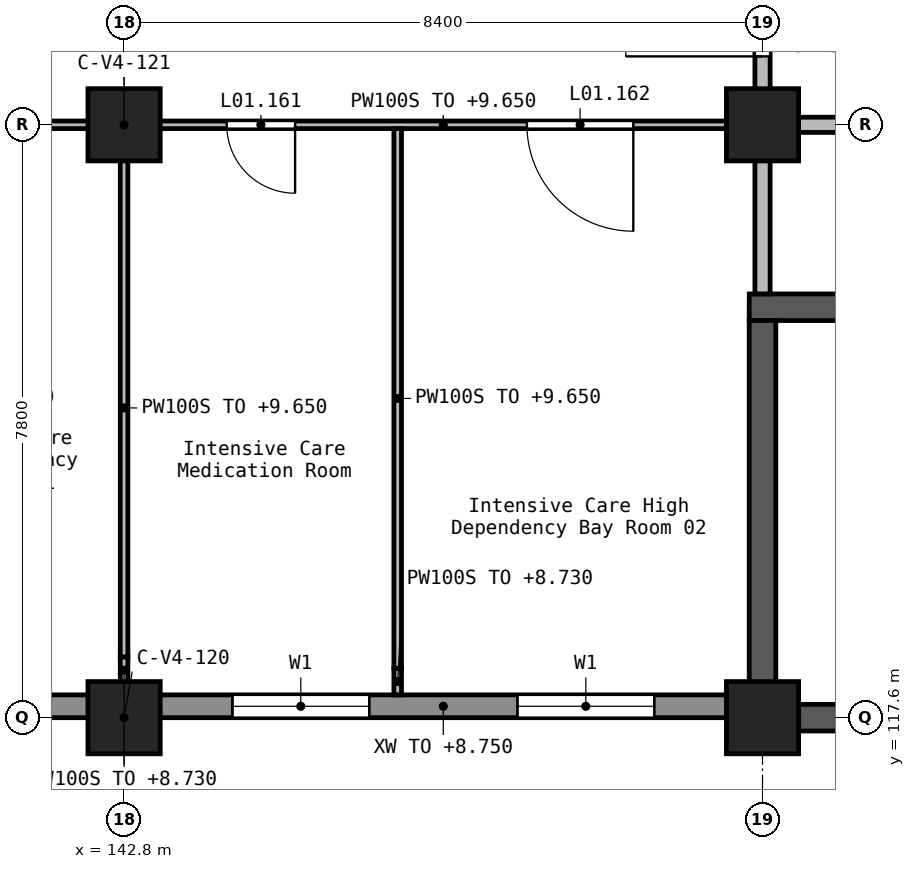
"""IFC4 building model, lengths in metres.
Left out: names, types, materials, properties, quantities, classifications, styles, units other than length and angle.
Written with IfcOpenShell. Run it as: python <this file> out.ifc"""

import sys

from ifc_helpers import new_model, si_unit, direction, frame, frame_2d, origin, origin_2d, place, context, subcontext, project, spatial, rectangle, extrude, element, fill, save


model = new_model("IFC4")
c1 = context("Model", 3, precision=1e-05, world=origin(), true_north=direction((0.0, 1.0)))
c2 = subcontext(c1, "Body", "Model", "MODEL_VIEW")
j1 = project(units=[si_unit("LENGTHUNIT", "METRE"), si_unit("PLANEANGLEUNIT", "RADIAN")], contexts=[c1])
p1 = place(None, origin())
s1 = spatial("IfcSite", under=j1, at=p1, CompositionType="ELEMENT")
p2 = place(p1, origin())
s2 = spatial("IfcBuilding", under=s1, at=p2, CompositionType="ELEMENT")
p3 = place(p2, frame((0.0, 0.0, 5.4)))
s3 = spatial("IfcBuildingStorey", under=s2, at=p3, CompositionType="ELEMENT", Elevation=5.4)
for number, where, z_axis, x_axis in (
    (1, (142.8, 117.6, 0.0), (0.0, 0.0, 1.0), (1.0, 0.0, 0.0)),
    (2, (142.8, 125.4, 0.0), (0.0, 0.0, 1.0), (1.0, 0.0, 0.0)),
    (3, (151.2, 117.6, 0.0), (0.0, 0.0, 1.0), (1.0, 0.0, 0.0)),
    (4, (151.2, 125.4, 0.0), (0.0, 0.0, 1.0), (1.0, 0.0, 0.0)),
):
    element("IfcColumn", number, at=place(p3, frame(where, z_axis=z_axis, x_axis=x_axis)), inside=s3, PredefinedType="COLUMN", context=c2, shape_type="SweptSolid", body=[
        extrude(rectangle(XDim=0.95, YDim=0.95, at=origin_2d()), origin(), (0.0, 0.0, 1.0), 4.5),
    ])
p4 = place(p3, frame((151.025, 123.0, 0.0), z_axis=(0.0, 0.0, 1.0), x_axis=(1.0, 0.0, 0.0)))
e5 = element("IfcWall", 5, at=p4, inside=s3, PredefinedType="SHEAR", context=c2, shape_type="SweptSolid", body=[
    extrude(rectangle(XDim=8.4, YDim=0.35, at=frame_2d((4.2, 0.0))), origin(), (0.0, 0.0, 1.0), 4.5),
])
p5 = place(p4, frame((6.875, 0.0, 0.0)))
e6 = element("IfcOpeningElement", 6, at=p5, cuts=e5, PredefinedType="OPENING", context=c2, shape_type="SweptSolid", body=[
    extrude(rectangle(XDim=1.1, YDim=2.1, at=frame_2d((0.55, 1.05))), frame((0.0, 0.185, 0.0), z_axis=(0.0, -1.0, 0.0), x_axis=(1.0, 0.0, 0.0)), (0.0, 0.0, 1.0), 0.37),
])
p6 = place(p3, frame((151.2, 117.425, 0.0), z_axis=(0.0, 0.0, 1.0), x_axis=(0.0, 1.0, 0.0)))
e7 = element("IfcWall", 7, at=p6, inside=s3, PredefinedType="SHEAR", context=c2, shape_type="SweptSolid", body=[
    extrude(rectangle(XDim=5.4, YDim=0.35, at=frame_2d((2.7, 0.0))), origin(), (0.0, 0.0, 1.0), 4.5),
])
p7 = place(p3, frame((151.375, 117.6, 0.0), z_axis=(0.0, 0.0, 1.0), x_axis=(1.0, 0.0, 0.0)))
e8 = element("IfcWall", 8, at=p7, inside=s3, PredefinedType="SHEAR", context=c2, shape_type="SweptSolid", body=[
    extrude(rectangle(XDim=8.05, YDim=0.35, at=frame_2d((4.025, 0.0))), origin(), (0.0, 0.0, 1.0), 4.5),
])
p8 = place(p3, frame((134.85, 117.75, 0.0), z_axis=(0.0, 0.0, 1.0), x_axis=(1.0, 0.0, 0.0)))
e9 = element("IfcWall", 9, at=p8, inside=s3, PredefinedType="STANDARD", context=c2, shape_type="SweptSolid", body=[
    extrude(rectangle(XDim=7.5, YDim=0.3, at=frame_2d((3.75, 0.0))), origin(), (0.0, 0.0, 1.0), 3.35),
])
p9 = place(p8, frame((0.975, 0.0, 0.9)))
e10 = element("IfcOpeningElement", 10, at=p9, cuts=e9, PredefinedType="OPENING", context=c2, shape_type="SweptSolid", body=[
    extrude(rectangle(XDim=1.8, YDim=1.5, at=frame_2d((0.9, 0.75))), frame((0.0, 0.16, 0.0), z_axis=(0.0, -1.0, 0.0), x_axis=(1.0, 0.0, 0.0)), (0.0, 0.0, 1.0), 0.32),
])
p10 = place(p8, frame((4.725, 0.0, 0.9)))
e11 = element("IfcOpeningElement", 11, at=p10, cuts=e9, PredefinedType="OPENING", context=c2, shape_type="SweptSolid", body=[
    extrude(rectangle(XDim=1.8, YDim=1.5, at=frame_2d((0.9, 0.75))), frame((0.0, 0.16, 0.0), z_axis=(0.0, -1.0, 0.0), x_axis=(1.0, 0.0, 0.0)), (0.0, 0.0, 1.0), 0.32),
])
p11 = place(p3, frame((143.25, 117.75, 0.0), z_axis=(0.0, 0.0, 1.0), x_axis=(1.0, 0.0, 0.0)))
e12 = element("IfcWall", 12, at=p11, inside=s3, PredefinedType="STANDARD", context=c2, shape_type="SweptSolid", body=[
    extrude(rectangle(XDim=7.5, YDim=0.3, at=frame_2d((3.75, 0.0))), origin(), (0.0, 0.0, 1.0), 3.35),
])
p12 = place(p11, frame((0.975, 0.0, 0.9)))
e13 = element("IfcOpeningElement", 13, at=p12, cuts=e12, PredefinedType="OPENING", context=c2, shape_type="SweptSolid", body=[
    extrude(rectangle(XDim=1.8, YDim=1.5, at=frame_2d((0.9, 0.75))), frame((0.0, 0.16, 0.0), z_axis=(0.0, -1.0, 0.0), x_axis=(1.0, 0.0, 0.0)), (0.0, 0.0, 1.0), 0.32),
])
p13 = place(p11, frame((4.725, 0.0, 0.9)))
e14 = element("IfcOpeningElement", 14, at=p13, cuts=e12, PredefinedType="OPENING", context=c2, shape_type="SweptSolid", body=[
    extrude(rectangle(XDim=1.8, YDim=1.5, at=frame_2d((0.9, 0.75))), frame((0.0, 0.16, 0.0), z_axis=(0.0, -1.0, 0.0), x_axis=(1.0, 0.0, 0.0)), (0.0, 0.0, 1.0), 0.32),
])
p14 = place(p3, frame((151.2, 123.175, 0.0), z_axis=(0.0, 0.0, 1.0), x_axis=(0.0, 1.0, 0.0)))
e15 = element("IfcWall", 15, at=p14, inside=s3, PredefinedType="SOLIDWALL", context=c2, shape_type="SweptSolid", body=[
    extrude(rectangle(XDim=1.775, YDim=0.2, at=frame_2d((0.887, 0.0))), origin(), (0.0, 0.0, 1.0), 4.25),
])
p15 = place(p3, frame((151.2, 125.85, 0.0), z_axis=(0.0, 0.0, 1.0), x_axis=(0.0, 1.0, 0.0)))
e16 = element("IfcWall", 16, at=p15, inside=s3, PredefinedType="SOLIDWALL", context=c2, shape_type="SweptSolid", body=[
    extrude(rectangle(XDim=2.7, YDim=0.2, at=frame_2d((1.35, 0.0))), origin(), (0.0, 0.0, 1.0), 4.25),
])
p16 = place(p15, frame((0.45, 0.0, 0.0)))
e17 = element("IfcOpeningElement", 17, at=p16, cuts=e16, PredefinedType="OPENING", context=c2, shape_type="SweptSolid", body=[
    extrude(rectangle(XDim=1.8, YDim=2.1, at=frame_2d((0.9, 1.05))), frame((0.0, 0.11, 0.0), z_axis=(0.0, -1.0, 0.0), x_axis=(1.0, 0.0, 0.0)), (0.0, 0.0, 1.0), 0.22),
])
p17 = place(p3, frame((151.65, 125.4, 0.0), z_axis=(0.0, 0.0, 1.0), x_axis=(1.0, 0.0, 0.0)))
e18 = element("IfcWall", 18, at=p17, inside=s3, PredefinedType="SOLIDWALL", context=c2, shape_type="SweptSolid", body=[
    extrude(rectangle(XDim=7.5, YDim=0.2, at=frame_2d((3.75, 0.0))), origin(), (0.0, 0.0, 1.0), 4.25),
])
p18 = place(p17, frame((3.2, 0.0, 0.0)))
e19 = element("IfcOpeningElement", 19, at=p18, cuts=e18, PredefinedType="OPENING", context=c2, shape_type="SweptSolid", body=[
    extrude(rectangle(XDim=1.1, YDim=2.1, at=frame_2d((0.55, 1.05))), frame((0.0, 0.11, 0.0), z_axis=(0.0, -1.0, 0.0), x_axis=(1.0, 0.0, 0.0)), (0.0, 0.0, 1.0), 0.22),
])
p19 = place(p3, frame((150.75, 125.4, 0.0), z_axis=(0.0, 0.0, 1.0), x_axis=(-1.0, 0.0, 0.0)))
e20 = element("IfcWall", 20, at=p19, inside=s3, PredefinedType="PARTITIONING", context=c2, shape_type="SweptSolid", body=[
    extrude(rectangle(XDim=7.5, YDim=0.1, at=frame_2d((3.75, 0.0))), origin(), (0.0, 0.0, 1.0), 4.25),
])
p20 = place(p19, frame((5.7, 0.0, 0.0)))
e21 = element("IfcOpeningElement", 21, at=p20, cuts=e20, PredefinedType="OPENING", context=c2, shape_type="SweptSolid", body=[
    extrude(rectangle(XDim=0.9, YDim=2.1, at=frame_2d((0.45, 1.05))), frame((0.0, 0.06, 0.0), z_axis=(0.0, -1.0, 0.0), x_axis=(1.0, 0.0, 0.0)), (0.0, 0.0, 1.0), 0.12),
])
p21 = place(p19, frame((1.25, 0.0, 0.0)))
e22 = element("IfcOpeningElement", 22, at=p21, cuts=e20, PredefinedType="OPENING", context=c2, shape_type="SweptSolid", body=[
    extrude(rectangle(XDim=1.4, YDim=2.1, at=frame_2d((0.7, 1.05))), frame((0.0, 0.06, 0.0), z_axis=(0.0, -1.0, 0.0), x_axis=(1.0, 0.0, 0.0)), (0.0, 0.0, 1.0), 0.12),
])
p22 = place(p3, frame((142.35, 125.4, 0.0), z_axis=(0.0, 0.0, 1.0), x_axis=(-1.0, 0.0, 0.0)))
e23 = element("IfcWall", 23, at=p22, inside=s3, PredefinedType="PARTITIONING", context=c2, shape_type="SweptSolid", body=[
    extrude(rectangle(XDim=7.5, YDim=0.1, at=frame_2d((3.75, 0.0))), origin(), (0.0, 0.0, 1.0), 4.25),
])
p23 = place(p22, frame((4.85, 0.0, 0.0)))
e24 = element("IfcOpeningElement", 24, at=p23, cuts=e23, PredefinedType="OPENING", context=c2, shape_type="SweptSolid", body=[
    extrude(rectangle(XDim=1.4, YDim=2.1, at=frame_2d((0.7, 1.05))), frame((0.0, 0.06, 0.0), z_axis=(0.0, -1.0, 0.0), x_axis=(1.0, 0.0, 0.0)), (0.0, 0.0, 1.0), 0.12),
])
p24 = place(p22, frame((0.65, 0.0, 0.0)))
e25 = element("IfcOpeningElement", 25, at=p24, cuts=e23, PredefinedType="OPENING", context=c2, shape_type="SweptSolid", body=[
    extrude(rectangle(XDim=1.4, YDim=2.1, at=frame_2d((0.7, 1.05))), frame((0.0, 0.06, 0.0), z_axis=(0.0, -1.0, 0.0), x_axis=(1.0, 0.0, 0.0)), (0.0, 0.0, 1.0), 0.12),
])
p25 = place(p3, frame((142.8, 118.05, 0.0), z_axis=(0.0, 0.0, 1.0), x_axis=(0.0, 1.0, 0.0)))
e26 = element("IfcWall", 26, at=p25, inside=s3, PredefinedType="PARTITIONING", context=c2, shape_type="SweptSolid", body=[
    extrude(rectangle(XDim=0.35, YDim=0.1, at=frame_2d((0.175, 0.0))), origin(), (0.0, 0.0, 1.0), 3.33),
])
p26 = place(p3, frame((142.8, 118.4, 0.0), z_axis=(0.0, 0.0, 1.0), x_axis=(0.0, 1.0, 0.0)))
e27 = element("IfcWall", 27, at=p26, inside=s3, PredefinedType="PARTITIONING", context=c2, shape_type="SweptSolid", body=[
    extrude(rectangle(XDim=6.55, YDim=0.1, at=frame_2d((3.275, 0.0))), origin(), (0.0, 0.0, 1.0), 4.25),
])
p27 = place(p3, frame((146.4, 117.9, 0.0), z_axis=(0.0, 0.0, 1.0), x_axis=(0.0, 1.0, 0.0)))
e28 = element("IfcWall", 28, at=p27, inside=s3, PredefinedType="PARTITIONING", context=c2, shape_type="SweptSolid", body=[
    extrude(rectangle(XDim=0.35, YDim=0.1, at=frame_2d((0.175, 0.0))), origin(), (0.0, 0.0, 1.0), 3.33),
])
p28 = place(p3, frame((146.4, 118.25, 0.0), z_axis=(0.0, 0.0, 1.0), x_axis=(0.0, 1.0, 0.0)))
e29 = element("IfcWall", 29, at=p28, inside=s3, PredefinedType="PARTITIONING", context=c2, shape_type="SweptSolid", body=[
    extrude(rectangle(XDim=7.1, YDim=0.1, at=frame_2d((3.55, 0.0))), origin(), (0.0, 0.0, 1.0), 4.25),
])
p29 = place(p12, origin())
e30 = element("IfcWindow", 30, at=p29, inside=s3, PartitioningType="SINGLE_PANEL", PredefinedType="WINDOW", context=c2, shape_type="SweptSolid", body=[
    extrude(rectangle(XDim=1.8, YDim=1.5, at=frame_2d((0.9, 0.75))), frame((0.0, 0.03, 0.0), z_axis=(0.0, -1.0, 0.0), x_axis=(1.0, 0.0, 0.0)), (0.0, 0.0, 1.0), 0.06),
])
fill(e13, e30)
p30 = place(p13, origin())
e31 = element("IfcWindow", 31, at=p30, inside=s3, PartitioningType="SINGLE_PANEL", PredefinedType="WINDOW", context=c2, shape_type="SweptSolid", body=[
    extrude(rectangle(XDim=1.8, YDim=1.5, at=frame_2d((0.9, 0.75))), frame((0.0, 0.03, 0.0), z_axis=(0.0, -1.0, 0.0), x_axis=(1.0, 0.0, 0.0)), (0.0, 0.0, 1.0), 0.06),
])
fill(e14, e31)
p31 = place(p16, origin())
e32 = element("IfcDoor", 32, at=p31, inside=s3, OperationType="DOUBLE_DOOR_SINGLE_SWING", PredefinedType="DOOR", context=c2, shape_type="SweptSolid", body=[
    extrude(rectangle(XDim=1.8, YDim=2.1, at=frame_2d((0.9, 1.05))), frame((0.0, 0.025, 0.0), z_axis=(0.0, -1.0, 0.0), x_axis=(1.0, 0.0, 0.0)), (0.0, 0.0, 1.0), 0.05),
])
fill(e17, e32)
p32 = place(p20, origin())
e33 = element("IfcDoor", 33, at=p32, inside=s3, OperationType="SINGLE_SWING_RIGHT", PredefinedType="DOOR", context=c2, shape_type="SweptSolid", body=[
    extrude(rectangle(XDim=0.9, YDim=2.1, at=frame_2d((0.45, 1.05))), frame((0.0, 0.025, 0.0), z_axis=(0.0, -1.0, 0.0), x_axis=(1.0, 0.0, 0.0)), (0.0, 0.0, 1.0), 0.05),
])
fill(e21, e33)
p33 = place(p21, origin())
e34 = element("IfcDoor", 34, at=p33, inside=s3, OperationType="DOUBLE_DOOR_SINGLE_SWING", PredefinedType="DOOR", context=c2, shape_type="SweptSolid", body=[
    extrude(rectangle(XDim=1.4, YDim=2.1, at=frame_2d((0.7, 1.05))), frame((0.0, 0.025, 0.0), z_axis=(0.0, -1.0, 0.0), x_axis=(1.0, 0.0, 0.0)), (0.0, 0.0, 1.0), 0.05),
])
fill(e22, e34)
save(model, sys.argv[1])
